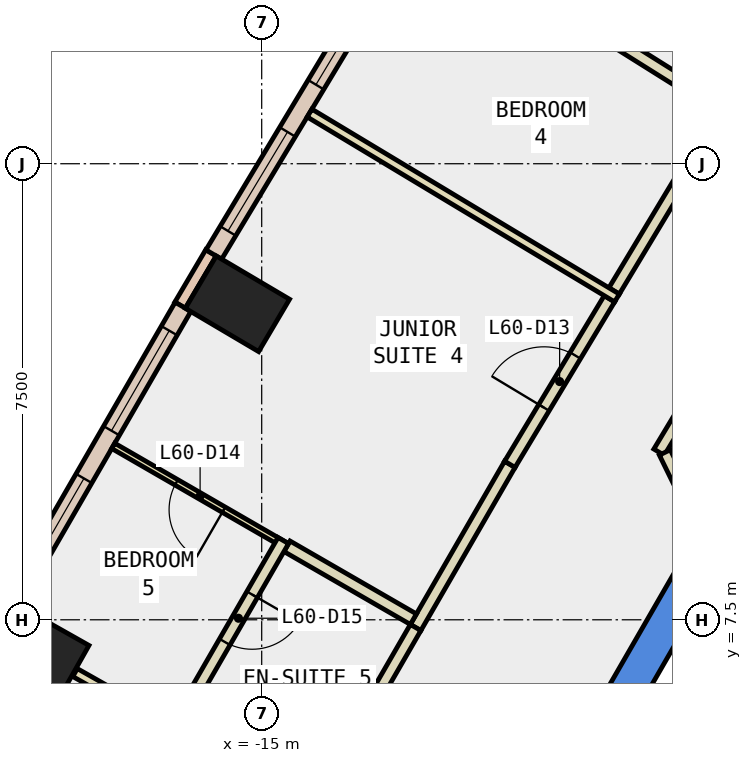
"""IFC4 building model, lengths in metres.
Left out: names, types, materials, properties, quantities, classifications, styles, units other than length and angle.
Written with IfcOpenShell. Run it as: python <this file> out.ifc"""

import sys

from ifc_helpers import new_model, si_unit, direction, frame, frame_2d, origin, origin_2d, place, context, subcontext, project, spatial, polyline, rectangle, outline, extrude, element, fill, save


model = new_model("IFC4")
c1 = context("Model", 3, precision=1e-05, world=origin(), true_north=direction((0.0, 1.0)))
c2 = subcontext(c1, "Body", "Model", "MODEL_VIEW")
j1 = project(units=[si_unit("LENGTHUNIT", "METRE"), si_unit("PLANEANGLEUNIT", "RADIAN")], contexts=[c1])
p1 = place(None, origin())
s1 = spatial("IfcSite", under=j1, at=p1, CompositionType="ELEMENT")
p2 = place(p1, origin())
s2 = spatial("IfcBuilding", under=s1, at=p2, CompositionType="ELEMENT")
p3 = place(p2, frame((0.0, 0.0, 263.0)))
s3 = spatial("IfcBuildingStorey", under=s2, at=p3, CompositionType="ELEMENT", Elevation=263.0)
for number, where, z_axis, x_axis in (
    (1, (-15.399, 12.697, -0.34), (0.0, 0.0, 1.0), (0.509, 0.861, 0.0)),
    (2, (-18.696, 6.987, -0.34), (0.0, 0.0, 1.0), (0.491, 0.871, 0.0)),
):
    element("IfcColumn", number, at=place(p3, frame(where, z_axis=z_axis, x_axis=x_axis)), inside=s3, PredefinedType="COLUMN", context=c2, shape_type="SweptSolid", body=[
        extrude(rectangle(XDim=1.0, YDim=1.4, at=origin_2d()), origin(), (0.0, 0.0, 1.0), 3.6),
    ])
p4 = place(p3, frame((0.0, 0.0, -0.34)))
e3 = element("IfcWall", 3, at=p4, inside=s3, PredefinedType="SHEAR", context=c2, shape_type="SweptSolid", body=[
    extrude(outline(polyline([(-10.535, 4.253), (-10.015, 3.953), (-5.427, 11.9), (-5.774, 12.5), (-10.535, 4.253)])), origin(), (0.0, 0.0, 1.0), 3.6),
])
p5 = place(p3, frame((-15.834, 13.535, 0.0), z_axis=(0.0, 0.0, 1.0), x_axis=(-0.508268432768, -0.861198699634, 0.0)))
e4 = element("IfcWall", 4, at=p5, inside=s3, PredefinedType="STANDARD", context=c2, shape_type="SweptSolid", body=[
    extrude(rectangle(XDim=1.0, YDim=0.2, at=frame_2d((0.5, 0.0))), origin(), (0.0, 0.0, 1.0), 3.26),
])
p6 = place(p3, frame((-12.895, 18.316, 0.0), z_axis=(0.0, 0.0, 1.0), x_axis=(-0.515435742129, -0.856928232547, 0.0)))
e5 = element("IfcWall", 5, at=p6, inside=s3, PredefinedType="STANDARD", context=c2, shape_type="SweptSolid", body=[
    extrude(rectangle(XDim=5.613, YDim=0.3, at=frame_2d((2.806, 0.0))), origin(), (0.0, 0.0, 1.0), 3.26),
])
p7 = place(p6, frame((0.453, 0.0, 0.9)))
e6 = element("IfcOpeningElement", 6, at=p7, cuts=e5, PredefinedType="OPENING", context=c2, shape_type="SweptSolid", body=[
    extrude(rectangle(XDim=1.9, YDim=2.0, at=frame_2d((0.95, 1.0))), frame((0.0, 0.16, 0.0), z_axis=(0.0, -1.0, 0.0), x_axis=(1.0, 0.0, 0.0)), (0.0, 0.0, 1.0), 0.32),
])
p8 = place(p6, frame((3.26, 0.0, 0.9)))
e7 = element("IfcOpeningElement", 7, at=p8, cuts=e5, PredefinedType="OPENING", context=c2, shape_type="SweptSolid", body=[
    extrude(rectangle(XDim=1.9, YDim=2.0, at=frame_2d((0.95, 1.0))), frame((0.0, 0.16, 0.0), z_axis=(0.0, -1.0, 0.0), x_axis=(1.0, 0.0, 0.0)), (0.0, 0.0, 1.0), 0.32),
])
p9 = place(p3, frame((-16.294, 12.647, 0.0), z_axis=(0.0, 0.0, 1.0), x_axis=(-0.500041292042, -0.866001562501, 0.0)))
e8 = element("IfcWall", 8, at=p9, inside=s3, PredefinedType="STANDARD", context=c2, shape_type="SweptSolid", body=[
    extrude(rectangle(XDim=5.612, YDim=0.3, at=frame_2d((2.806, 0.0))), origin(), (0.0, 0.0, 1.0), 3.26),
])
p10 = place(p9, frame((0.453, 0.0, 0.9)))
e9 = element("IfcOpeningElement", 9, at=p10, cuts=e8, PredefinedType="OPENING", context=c2, shape_type="SweptSolid", body=[
    extrude(rectangle(XDim=1.9, YDim=2.0, at=frame_2d((0.95, 1.0))), frame((0.0, 0.16, 0.0), z_axis=(0.0, -1.0, 0.0), x_axis=(1.0, 0.0, 0.0)), (0.0, 0.0, 1.0), 0.32),
])
p11 = place(p9, frame((3.259, 0.0, 0.9)))
e10 = element("IfcOpeningElement", 10, at=p11, cuts=e8, PredefinedType="OPENING", context=c2, shape_type="SweptSolid", body=[
    extrude(rectangle(XDim=1.9, YDim=2.0, at=frame_2d((0.95, 1.0))), frame((0.0, 0.16, 0.0), z_axis=(0.0, -1.0, 0.0), x_axis=(1.0, 0.0, 0.0)), (0.0, 0.0, 1.0), 0.32),
])
p12 = place(p3, frame((-6.054, 14.264, 0.0), z_axis=(0.0, 0.0, 1.0), x_axis=(-0.515508653897, -0.856884372455, 0.0)))
e11 = element("IfcWall", 11, at=p12, inside=s3, PredefinedType="PARTITIONING", context=c2, shape_type="SweptSolid", body=[
    extrude(rectangle(XDim=4.677, YDim=0.2, at=frame_2d((2.339, 0.0))), origin(), (0.0, 0.0, 1.0), 3.26),
])
p13 = place(p12, frame((1.839, 0.0, 0.0)))
e12 = element("IfcOpeningElement", 12, at=p13, cuts=e11, PredefinedType="OPENING", context=c2, shape_type="SweptSolid", body=[
    extrude(rectangle(XDim=1.0, YDim=2.1, at=frame_2d((0.5, 1.05))), frame((0.0, 0.11, 0.0), z_axis=(0.0, -1.0, 0.0), x_axis=(1.0, 0.0, 0.0)), (0.0, 0.0, 1.0), 0.22),
])
p14 = place(p3, frame((-8.37, 10.252, 0.0), z_axis=(0.0, 0.0, 1.0), x_axis=(0.440562172885, -0.897722101668, 0.0)))
e13 = element("IfcWall", 13, at=p14, inside=s3, PredefinedType="PARTITIONING", context=c2, shape_type="SweptSolid", body=[
    extrude(rectangle(XDim=1.353, YDim=0.2, at=frame_2d((0.677, 0.0))), origin(), (0.0, 0.0, 1.0), 3.26),
])
p15 = place(p3, frame((-9.204, 12.908, 0.0), z_axis=(0.0, 0.0, 1.0), x_axis=(0.51556943596, 0.856847802532, 0.0)))
e14 = element("IfcWall", 14, at=p15, inside=s3, PredefinedType="PARTITIONING", context=c2, shape_type="SweptSolid", body=[
    extrude(rectangle(XDim=3.176, YDim=0.2, at=frame_2d((1.588, 0.0))), origin(), (0.0, 0.0, 1.0), 3.26),
])
p16 = place(p3, frame((-12.469, 7.373, 0.0), z_axis=(0.0, 0.0, 1.0), x_axis=(0.500129289791, 0.86595074542, 0.0)))
e15 = element("IfcWall", 15, at=p16, inside=s3, PredefinedType="PARTITIONING", context=c2, shape_type="SweptSolid", body=[
    extrude(rectangle(XDim=3.099, YDim=0.2, at=frame_2d((1.55, 0.0))), origin(), (0.0, 0.0, 1.0), 3.26),
])
p17 = place(p3, frame((-10.919, 10.057, 0.0), z_axis=(0.0, 0.0, 1.0), x_axis=(0.515568955032, 0.856848091908, 0.0)))
e16 = element("IfcWall", 16, at=p17, inside=s3, PredefinedType="PARTITIONING", context=c2, shape_type="SweptSolid", body=[
    extrude(rectangle(XDim=3.177, YDim=0.2, at=frame_2d((1.588, 0.0))), origin(), (0.0, 0.0, 1.0), 3.26),
])
p18 = place(p17, frame((1.088, 0.0, 0.0)))
e17 = element("IfcOpeningElement", 17, at=p18, cuts=e16, PredefinedType="OPENING", context=c2, shape_type="SweptSolid", body=[
    extrude(rectangle(XDim=1.0, YDim=2.1, at=frame_2d((0.5, 1.05))), frame((0.0, 0.11, 0.0), z_axis=(0.0, -1.0, 0.0), x_axis=(1.0, 0.0, 0.0)), (0.0, 0.0, 1.0), 0.22),
])
p19 = place(p3, frame((-13.869, 4.948, 0.0), z_axis=(0.0, 0.0, 1.0), x_axis=(0.49994636267, 0.866056369097, 0.0)))
e18 = element("IfcWall", 18, at=p19, inside=s3, PredefinedType="PARTITIONING", context=c2, shape_type="SweptSolid", body=[
    extrude(rectangle(XDim=2.8, YDim=0.2, at=frame_2d((1.4, 0.0))), origin(), (0.0, 0.0, 1.0), 3.26),
])
p20 = place(p3, frame((-9.517, 17.226, 0.0), z_axis=(0.0, 0.0, 1.0), x_axis=(0.847229363594, -0.53122726348, 0.0)))
e19 = element("IfcWall", 19, at=p20, inside=s3, PredefinedType="PARTITIONING", context=c2, shape_type="SweptSolid", body=[
    extrude(rectangle(XDim=2.5, YDim=0.2, at=frame_2d((1.25, 0.0))), origin(), (0.0, 0.0, 1.0), 3.26),
])
p21 = place(p3, frame((-9.157, 12.792, 0.0), z_axis=(0.0, 0.0, 1.0), x_axis=(-0.856933793276, 0.515426497129, 0.0)))
e20 = element("IfcWall", 20, at=p21, inside=s3, PredefinedType="PARTITIONING", context=c2, shape_type="SweptSolid", body=[
    extrude(rectangle(XDim=5.9, YDim=0.15, at=frame_2d((2.95, 0.0))), origin(), (0.0, 0.0, 1.0), 3.26),
])
p22 = place(p3, frame((-14.584, 8.71, 0.0), z_axis=(0.0, 0.0, 1.0), x_axis=(-0.866008176907, 0.50002983664, 0.0)))
e21 = element("IfcWall", 21, at=p22, inside=s3, PredefinedType="PARTITIONING", context=c2, shape_type="SweptSolid", body=[
    extrude(rectangle(XDim=3.3, YDim=0.1, at=frame_2d((1.65, 0.0))), origin(), (0.0, 0.0, 1.0), 3.26),
])
p23 = place(p22, frame((1.2, 0.0, 0.0)))
e22 = element("IfcOpeningElement", 22, at=p23, cuts=e21, PredefinedType="OPENING", context=c2, shape_type="SweptSolid", body=[
    extrude(rectangle(XDim=0.9, YDim=2.1, at=frame_2d((0.45, 1.05))), frame((0.0, 0.06, 0.0), z_axis=(0.0, -1.0, 0.0), x_axis=(1.0, 0.0, 0.0)), (0.0, 0.0, 1.0), 0.12),
])
p24 = place(p3, frame((-12.505, 7.51, 0.0), z_axis=(0.0, 0.0, 1.0), x_axis=(-0.866277021052, 0.499563932643, 0.0)))
e23 = element("IfcWall", 23, at=p24, inside=s3, PredefinedType="PARTITIONING", context=c2, shape_type="SweptSolid", body=[
    extrude(rectangle(XDim=2.4, YDim=0.2, at=frame_2d((1.2, 0.0))), origin(), (0.0, 0.0, 1.0), 3.26),
])
p25 = place(p3, frame((-14.645, 8.803, 0.0), z_axis=(0.0, 0.0, 1.0), x_axis=(-0.500001826776, -0.866024349092, 0.0)))
e24 = element("IfcWall", 24, at=p25, inside=s3, PredefinedType="PARTITIONING", context=c2, shape_type="SweptSolid", body=[
    extrude(rectangle(XDim=2.95, YDim=0.2, at=frame_2d((1.475, 0.0))), origin(), (0.0, 0.0, 1.0), 3.26),
])
p26 = place(p25, frame((1.025, 0.0, 0.0)))
e25 = element("IfcOpeningElement", 25, at=p26, cuts=e24, PredefinedType="OPENING", context=c2, shape_type="SweptSolid", body=[
    extrude(rectangle(XDim=0.9, YDim=2.1, at=frame_2d((0.45, 1.05))), frame((0.0, 0.11, 0.0), z_axis=(0.0, -1.0, 0.0), x_axis=(1.0, 0.0, 0.0)), (0.0, 0.0, 1.0), 0.22),
])
p27 = place(p3, frame((-14.083, 4.377, 0.0), z_axis=(0.0, 0.0, 1.0), x_axis=(-0.870415885751, 0.492317159799, 0.0)))
e26 = element("IfcWall", 26, at=p27, inside=s3, PredefinedType="PARTITIONING", context=c2, shape_type="SweptSolid", body=[
    extrude(rectangle(XDim=4.581, YDim=0.15, at=frame_2d((2.29, 0.0))), origin(), (0.0, 0.0, 1.0), 3.26),
])
p28 = place(p3, frame((-5.03, 9.388, 0.0), z_axis=(0.0, 0.0, 1.0), x_axis=(-0.499978703459, -0.866037698999, 0.0)))
e27 = element("IfcWall", 27, at=p28, inside=s3, PredefinedType="STANDARD", context=c2, shape_type="SweptSolid", body=[
    extrude(rectangle(XDim=6.9, YDim=0.2, at=frame_2d((3.45, 0.0))), origin(), (0.0, 0.0, 1.0), 3.26),
])
p29 = place(p7, origin())
e28 = element("IfcWindow", 28, at=p29, inside=s3, PartitioningType="SINGLE_PANEL", PredefinedType="WINDOW", context=c2, shape_type="SweptSolid", body=[
    extrude(rectangle(XDim=1.9, YDim=2.0, at=frame_2d((0.95, 1.0))), frame((0.0, 0.03, 0.0), z_axis=(0.0, -1.0, 0.0), x_axis=(1.0, 0.0, 0.0)), (0.0, 0.0, 1.0), 0.06),
])
fill(e6, e28)
p30 = place(p8, origin())
e29 = element("IfcWindow", 29, at=p30, inside=s3, PartitioningType="SINGLE_PANEL", PredefinedType="WINDOW", context=c2, shape_type="SweptSolid", body=[
    extrude(rectangle(XDim=1.9, YDim=2.0, at=frame_2d((0.95, 1.0))), frame((0.0, 0.03, 0.0), z_axis=(0.0, -1.0, 0.0), x_axis=(1.0, 0.0, 0.0)), (0.0, 0.0, 1.0), 0.06),
])
fill(e7, e29)
p31 = place(p10, origin())
e30 = element("IfcWindow", 30, at=p31, inside=s3, PartitioningType="SINGLE_PANEL", PredefinedType="WINDOW", context=c2, shape_type="SweptSolid", body=[
    extrude(rectangle(XDim=1.9, YDim=2.0, at=frame_2d((0.95, 1.0))), frame((0.0, 0.03, 0.0), z_axis=(0.0, -1.0, 0.0), x_axis=(1.0, 0.0, 0.0)), (0.0, 0.0, 1.0), 0.06),
])
fill(e9, e30)
p32 = place(p11, origin())
e31 = element("IfcWindow", 31, at=p32, inside=s3, PartitioningType="SINGLE_PANEL", PredefinedType="WINDOW", context=c2, shape_type="SweptSolid", body=[
    extrude(rectangle(XDim=1.9, YDim=2.0, at=frame_2d((0.95, 1.0))), frame((0.0, 0.03, 0.0), z_axis=(0.0, -1.0, 0.0), x_axis=(1.0, 0.0, 0.0)), (0.0, 0.0, 1.0), 0.06),
])
fill(e10, e31)
p33 = place(p18, origin())
e32 = element("IfcDoor", 32, at=p33, inside=s3, OperationType="SINGLE_SWING_LEFT", PredefinedType="DOOR", context=c2, shape_type="SweptSolid", body=[
    extrude(rectangle(XDim=1.0, YDim=2.1, at=frame_2d((0.5, 1.05))), frame((0.0, 0.025, 0.0), z_axis=(0.0, -1.0, 0.0), x_axis=(1.0, 0.0, 0.0)), (0.0, 0.0, 1.0), 0.05),
])
fill(e17, e32)
p34 = place(p23, origin())
e33 = element("IfcDoor", 33, at=p34, inside=s3, OperationType="SINGLE_SWING_LEFT", PredefinedType="DOOR", context=c2, shape_type="SweptSolid", body=[
    extrude(rectangle(XDim=0.9, YDim=2.1, at=frame_2d((0.45, 1.05))), frame((0.0, 0.025, 0.0), z_axis=(0.0, -1.0, 0.0), x_axis=(1.0, 0.0, 0.0)), (0.0, 0.0, 1.0), 0.05),
])
fill(e22, e33)
p35 = place(p26, origin())
e34 = element("IfcDoor", 34, at=p35, inside=s3, OperationType="SINGLE_SWING_LEFT", PredefinedType="DOOR", context=c2, shape_type="SweptSolid", body=[
    extrude(rectangle(XDim=0.9, YDim=2.1, at=frame_2d((0.45, 1.05))), frame((0.0, 0.025, 0.0), z_axis=(0.0, -1.0, 0.0), x_axis=(1.0, 0.0, 0.0)), (0.0, 0.0, 1.0), 0.05),
])
fill(e25, e34)
save(model, sys.argv[1])
